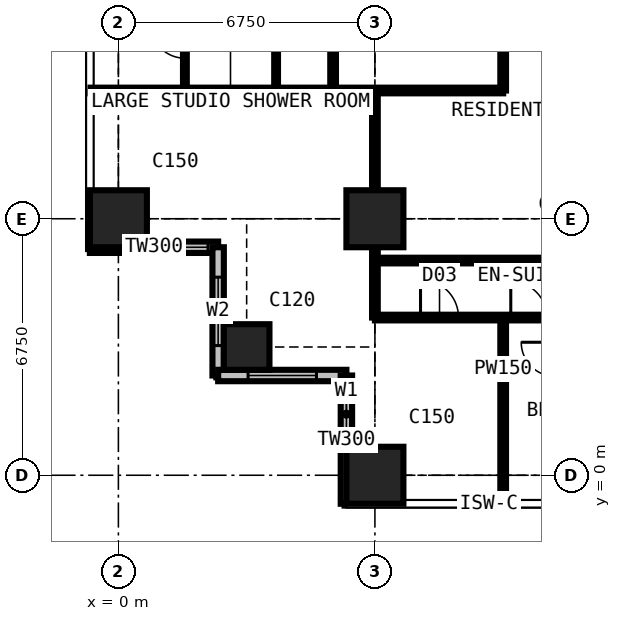
"""IFC4 building model, lengths in metres.
Left out: names, types, materials, properties, quantities, classifications, styles, units other than length and angle.
Written with IfcOpenShell. Run it as: python <this file> out.ifc"""

import sys

from ifc_helpers import new_model, si_unit, direction, frame, frame_2d, origin, origin_2d, place, context, subcontext, project, spatial, rectangle, extrude, element, fill, save


model = new_model("IFC4")
c1 = context("Model", 3, precision=1e-05, world=origin(), true_north=direction((0.0, 1.0)))
c2 = subcontext(c1, "Body", "Model", "MODEL_VIEW")
j1 = project(units=[si_unit("LENGTHUNIT", "METRE"), si_unit("PLANEANGLEUNIT", "RADIAN")], contexts=[c1])
p1 = place(None, origin())
s1 = spatial("IfcSite", under=j1, at=p1, CompositionType="ELEMENT")
p2 = place(p1, origin())
s2 = spatial("IfcBuilding", under=s1, at=p2, CompositionType="ELEMENT")
p3 = place(p2, frame((0.0, 0.0, 149.4)))
s3 = spatial("IfcBuildingStorey", under=s2, at=p3, CompositionType="ELEMENT", Elevation=149.4)
p4 = place(p3, frame((0.0, 6.75, 0.0), z_axis=(0.0, 0.0, 1.0), x_axis=(1.0, 0.0, 0.0)))
e1 = element("IfcColumn", 1, at=p4, inside=s3, PredefinedType="COLUMN", context=c2, shape_type="SweptSolid", body=[
    extrude(rectangle(XDim=1.5, YDim=1.5, at=origin_2d()), origin(), (0.0, 0.0, 1.0), 3.6),
])
p5 = place(p3, frame((3.375, 3.375, 0.0), z_axis=(0.0, 0.0, 1.0), x_axis=(1.0, 0.0, 0.0)))
e2 = element("IfcColumn", 2, at=p5, inside=s3, PredefinedType="COLUMN", context=c2, shape_type="SweptSolid", body=[
    extrude(rectangle(XDim=1.2, YDim=1.2, at=origin_2d()), origin(), (0.0, 0.0, 1.0), 3.6),
])
for number, where, z_axis, x_axis in (
    (3, (6.75, 0.0, 0.0), (0.0, 0.0, 1.0), (1.0, 0.0, 0.0)),
    (4, (6.75, 6.75, 0.0), (0.0, 0.0, 1.0), (1.0, 0.0, 0.0)),
):
    element("IfcColumn", number, at=place(p3, frame(where, z_axis=z_axis, x_axis=x_axis)), inside=s3, PredefinedType="COLUMN", context=c2, shape_type="SweptSolid", body=[
        extrude(rectangle(XDim=1.5, YDim=1.5, at=origin_2d()), origin(), (0.0, 0.0, 1.0), 3.6),
    ])
p6 = place(p3, frame((-0.75, 6.0, 0.0), z_axis=(0.0, 0.0, 1.0), x_axis=(1.0, 0.0, 0.0)))
e5 = element("IfcWall", 5, at=p6, inside=s3, PredefinedType="SOLIDWALL", context=c2, shape_type="SweptSolid", body=[
    extrude(rectangle(XDim=3.375, YDim=0.3, at=frame_2d((1.688, 0.0))), origin(), (0.0, 0.0, 1.0), 3.375),
])
p7 = place(p6, frame((1.607, 0.0, 0.9)))
e6 = element("IfcOpeningElement", 6, at=p7, cuts=e5, PredefinedType="OPENING", context=c2, shape_type="SweptSolid", body=[
    extrude(rectangle(XDim=1.5, YDim=1.8, at=frame_2d((0.75, 0.9))), frame((0.0, 0.16, 0.0), z_axis=(0.0, -1.0, 0.0), x_axis=(1.0, 0.0, 0.0)), (0.0, 0.0, 1.0), 0.32),
])
p8 = place(p3, frame((2.625, 6.0, 0.0), z_axis=(0.0, 0.0, 1.0), x_axis=(0.0, -1.0, 0.0)))
e7 = element("IfcWall", 7, at=p8, inside=s3, PredefinedType="SOLIDWALL", context=c2, shape_type="SweptSolid", body=[
    extrude(rectangle(XDim=3.375, YDim=0.3, at=frame_2d((1.688, 0.0))), origin(), (0.0, 0.0, 1.0), 3.375),
])
p9 = place(p8, frame((0.788, 0.0, 0.6)))
e8 = element("IfcOpeningElement", 8, at=p9, cuts=e7, PredefinedType="OPENING", context=c2, shape_type="SweptSolid", body=[
    extrude(rectangle(XDim=1.8, YDim=2.1, at=frame_2d((0.9, 1.05))), frame((0.0, 0.16, 0.0), z_axis=(0.0, -1.0, 0.0), x_axis=(1.0, 0.0, 0.0)), (0.0, 0.0, 1.0), 0.32),
])
p10 = place(p3, frame((2.625, 2.625, 0.0), z_axis=(0.0, 0.0, 1.0), x_axis=(1.0, 0.0, 0.0)))
e9 = element("IfcWall", 9, at=p10, inside=s3, PredefinedType="SOLIDWALL", context=c2, shape_type="SweptSolid", body=[
    extrude(rectangle(XDim=3.375, YDim=0.3, at=frame_2d((1.688, 0.0))), origin(), (0.0, 0.0, 1.0), 3.375),
])
p11 = place(p10, frame((0.788, 0.0, 0.6)))
e10 = element("IfcOpeningElement", 10, at=p11, cuts=e9, PredefinedType="OPENING", context=c2, shape_type="SweptSolid", body=[
    extrude(rectangle(XDim=1.8, YDim=2.1, at=frame_2d((0.9, 1.05))), frame((0.0, 0.16, 0.0), z_axis=(0.0, -1.0, 0.0), x_axis=(1.0, 0.0, 0.0)), (0.0, 0.0, 1.0), 0.32),
])
p12 = place(p3, frame((6.0, 2.625, 0.0), z_axis=(0.0, 0.0, 1.0), x_axis=(0.0, -1.0, 0.0)))
e11 = element("IfcWall", 11, at=p12, inside=s3, PredefinedType="SOLIDWALL", context=c2, shape_type="SweptSolid", body=[
    extrude(rectangle(XDim=3.375, YDim=0.3, at=frame_2d((1.688, 0.0))), origin(), (0.0, 0.0, 1.0), 3.375),
])
p13 = place(p12, frame((0.268, 0.0, 0.9)))
e12 = element("IfcOpeningElement", 12, at=p13, cuts=e11, PredefinedType="OPENING", context=c2, shape_type="SweptSolid", body=[
    extrude(rectangle(XDim=1.5, YDim=1.8, at=frame_2d((0.75, 0.9))), frame((0.0, 0.16, 0.0), z_axis=(0.0, -1.0, 0.0), x_axis=(1.0, 0.0, 0.0)), (0.0, 0.0, 1.0), 0.32),
])
p14 = place(p3, frame((-0.734, 10.125, 0.0), z_axis=(0.0, 0.0, 1.0), x_axis=(1.0, 0.0, 0.0)))
e13 = element("IfcWall", 13, at=p14, inside=s3, PredefinedType="PARTITIONING", context=c2, shape_type="SweptSolid", body=[
    extrude(rectangle(XDim=10.859, YDim=0.15, at=frame_2d((5.429, 0.0))), origin(), (0.0, 0.0, 1.0), 3.375),
])
p15 = place(p3, frame((1.75, 10.125, 0.0), z_axis=(0.0, 0.0, 1.0), x_axis=(0.0, 1.0, 0.0)))
e14 = element("IfcWall", 14, at=p15, inside=s3, PredefinedType="PARTITIONING", context=c2, shape_type="SweptSolid", body=[
    extrude(rectangle(XDim=2.6, YDim=0.1, at=frame_2d((1.3, 0.0))), origin(), (0.0, 0.0, 1.0), 3.375),
])
p16 = place(p15, frame((0.85, 0.0, 0.0)))
e15 = element("IfcOpeningElement", 15, at=p16, cuts=e14, PredefinedType="OPENING", context=c2, shape_type="SweptSolid", body=[
    extrude(rectangle(XDim=0.9, YDim=2.2, at=frame_2d((0.45, 1.1))), frame((0.0, 0.06, 0.0), z_axis=(0.0, -1.0, 0.0), x_axis=(1.0, 0.0, 0.0)), (0.0, 0.0, 1.0), 0.12),
])
p17 = place(p3, frame((4.15, 10.125, 0.0), z_axis=(0.0, 0.0, 1.0), x_axis=(0.0, 1.0, 0.0)))
e16 = element("IfcWall", 16, at=p17, inside=s3, PredefinedType="PARTITIONING", context=c2, shape_type="SweptSolid", body=[
    extrude(rectangle(XDim=16.875, YDim=0.1, at=frame_2d((8.438, 0.0))), origin(), (0.0, 0.0, 1.0), 3.375),
])
p18 = place(p17, frame((4.2, 0.0, 0.0)))
e17 = element("IfcOpeningElement", 17, at=p18, cuts=e16, PredefinedType="OPENING", context=c2, shape_type="SweptSolid", body=[
    extrude(rectangle(XDim=0.95, YDim=2.2, at=frame_2d((0.475, 1.1))), frame((0.0, 0.06, 0.0), z_axis=(0.0, -1.0, 0.0), x_axis=(1.0, 0.0, 0.0)), (0.0, 0.0, 1.0), 0.12),
])
p19 = place(p17, frame((10.95, 0.0, 0.0)))
e18 = element("IfcOpeningElement", 18, at=p19, cuts=e16, PredefinedType="OPENING", context=c2, shape_type="SweptSolid", body=[
    extrude(rectangle(XDim=0.95, YDim=2.2, at=frame_2d((0.475, 1.1))), frame((0.0, 0.06, 0.0), z_axis=(0.0, -1.0, 0.0), x_axis=(1.0, 0.0, 0.0)), (0.0, 0.0, 1.0), 0.12),
])
p20 = place(p3, frame((5.65, 10.125, 0.0), z_axis=(0.0, 0.0, 1.0), x_axis=(0.0, 1.0, 0.0)))
e19 = element("IfcWall", 19, at=p20, inside=s3, PredefinedType="PARTITIONING", context=c2, shape_type="SweptSolid", body=[
    extrude(rectangle(XDim=10.762, YDim=0.15, at=frame_2d((5.381, 0.0))), origin(), (0.0, 0.0, 1.0), 3.375),
])
p21 = place(p20, frame((4.9, 0.0, 0.0)))
e20 = element("IfcOpeningElement", 20, at=p21, cuts=e19, PredefinedType="OPENING", context=c2, shape_type="SweptSolid", body=[
    extrude(rectangle(XDim=0.95, YDim=2.2, at=frame_2d((0.475, 1.1))), frame((0.0, 0.085, 0.0), z_axis=(0.0, -1.0, 0.0), x_axis=(1.0, 0.0, 0.0)), (0.0, 0.0, 1.0), 0.17),
])
p22 = place(p3, frame((6.75, 4.15, 0.0), z_axis=(0.0, 0.0, 1.0), x_axis=(0.0, 1.0, 0.0)))
e21 = element("IfcWall", 21, at=p22, inside=s3, PredefinedType="PARTITIONING", context=c2, shape_type="SweptSolid", body=[
    extrude(rectangle(XDim=5.975, YDim=0.15, at=frame_2d((2.988, 0.0))), origin(), (0.0, 0.0, 1.0), 2.877),
])
p23 = place(p3, frame((6.75, 4.15, 0.0), z_axis=(0.0, 0.0, 1.0), x_axis=(1.0, 0.0, 0.0)))
e22 = element("IfcWall", 22, at=p23, inside=s3, PredefinedType="PARTITIONING", context=c2, shape_type="SweptSolid", body=[
    extrude(rectangle(XDim=20.25, YDim=0.15, at=frame_2d((10.125, 0.0))), origin(), (0.0, 0.0, 1.0), 3.375),
])
p24 = place(p23, frame((1.2, 0.0, 0.0)))
e23 = element("IfcOpeningElement", 23, at=p24, cuts=e22, PredefinedType="OPENING", context=c2, shape_type="SweptSolid", body=[
    extrude(rectangle(XDim=1.0, YDim=2.2, at=frame_2d((0.5, 1.1))), frame((0.0, 0.085, 0.0), z_axis=(0.0, -1.0, 0.0), x_axis=(1.0, 0.0, 0.0)), (0.0, 0.0, 1.0), 0.17),
])
p25 = place(p23, frame((3.575, 0.0, 0.0)))
e24 = element("IfcOpeningElement", 24, at=p25, cuts=e22, PredefinedType="OPENING", context=c2, shape_type="SweptSolid", body=[
    extrude(rectangle(XDim=0.95, YDim=2.2, at=frame_2d((0.475, 1.1))), frame((0.0, 0.085, 0.0), z_axis=(0.0, -1.0, 0.0), x_axis=(1.0, 0.0, 0.0)), (0.0, 0.0, 1.0), 0.17),
])
p26 = place(p23, frame((7.0, 0.0, 0.0)))
e25 = element("IfcOpeningElement", 25, at=p26, cuts=e22, PredefinedType="OPENING", context=c2, shape_type="SweptSolid", body=[
    extrude(rectangle(XDim=0.95, YDim=2.2, at=frame_2d((0.475, 1.1))), frame((0.0, 0.085, 0.0), z_axis=(0.0, -1.0, 0.0), x_axis=(1.0, 0.0, 0.0)), (0.0, 0.0, 1.0), 0.17),
])
p27 = place(p23, frame((10.375, 0.0, 0.0)))
e26 = element("IfcOpeningElement", 26, at=p27, cuts=e22, PredefinedType="OPENING", context=c2, shape_type="SweptSolid", body=[
    extrude(rectangle(XDim=0.95, YDim=2.2, at=frame_2d((0.475, 1.1))), frame((0.0, 0.085, 0.0), z_axis=(0.0, -1.0, 0.0), x_axis=(1.0, 0.0, 0.0)), (0.0, 0.0, 1.0), 0.17),
])
p28 = place(p23, frame((15.1, 0.0, 0.0)))
e27 = element("IfcOpeningElement", 27, at=p28, cuts=e22, PredefinedType="OPENING", context=c2, shape_type="SweptSolid", body=[
    extrude(rectangle(XDim=0.95, YDim=2.2, at=frame_2d((0.475, 1.1))), frame((0.0, 0.085, 0.0), z_axis=(0.0, -1.0, 0.0), x_axis=(1.0, 0.0, 0.0)), (0.0, 0.0, 1.0), 0.17),
])
p29 = place(p3, frame((6.75, 5.65, 0.0), z_axis=(0.0, 0.0, 1.0), x_axis=(1.0, 0.0, 0.0)))
e28 = element("IfcWall", 28, at=p29, inside=s3, PredefinedType="PARTITIONING", context=c2, shape_type="SweptSolid", body=[
    extrude(rectangle(XDim=11.05, YDim=0.15, at=frame_2d((5.525, 0.0))), origin(), (0.0, 0.0, 1.0), 3.375),
])
p30 = place(p3, frame((10.125, -0.734, 0.0), z_axis=(0.0, 0.0, 1.0), x_axis=(0.0, 1.0, 0.0)))
e29 = element("IfcWall", 29, at=p30, inside=s3, PredefinedType="PARTITIONING", context=c2, shape_type="SweptSolid", body=[
    extrude(rectangle(XDim=4.884, YDim=0.15, at=frame_2d((2.442, 0.0))), origin(), (0.0, 0.0, 1.0), 3.375),
])
p31 = place(p3, frame((10.125, 10.125, 0.0), z_axis=(0.0, 0.0, 1.0), x_axis=(0.0, 1.0, 0.0)))
e30 = element("IfcWall", 30, at=p31, inside=s3, PredefinedType="PARTITIONING", context=c2, shape_type="SweptSolid", body=[
    extrude(rectangle(XDim=1.175, YDim=0.15, at=frame_2d((0.587, 0.0))), origin(), (0.0, 0.0, 1.0), 3.375),
])
p32 = place(p7, origin())
e31 = element("IfcWindow", 31, at=p32, inside=s3, PartitioningType="SINGLE_PANEL", PredefinedType="WINDOW", context=c2, shape_type="SweptSolid", body=[
    extrude(rectangle(XDim=1.5, YDim=1.8, at=frame_2d((0.75, 0.9))), frame((0.0, 0.03, 0.0), z_axis=(0.0, -1.0, 0.0), x_axis=(1.0, 0.0, 0.0)), (0.0, 0.0, 1.0), 0.06),
])
fill(e6, e31)
p33 = place(p9, origin())
e32 = element("IfcWindow", 32, at=p33, inside=s3, PartitioningType="SINGLE_PANEL", PredefinedType="WINDOW", context=c2, shape_type="SweptSolid", body=[
    extrude(rectangle(XDim=1.8, YDim=2.1, at=frame_2d((0.9, 1.05))), frame((0.0, 0.03, 0.0), z_axis=(0.0, -1.0, 0.0), x_axis=(1.0, 0.0, 0.0)), (0.0, 0.0, 1.0), 0.06),
])
fill(e8, e32)
p34 = place(p11, origin())
e33 = element("IfcWindow", 33, at=p34, inside=s3, PartitioningType="SINGLE_PANEL", PredefinedType="WINDOW", context=c2, shape_type="SweptSolid", body=[
    extrude(rectangle(XDim=1.8, YDim=2.1, at=frame_2d((0.9, 1.05))), frame((0.0, 0.03, 0.0), z_axis=(0.0, -1.0, 0.0), x_axis=(1.0, 0.0, 0.0)), (0.0, 0.0, 1.0), 0.06),
])
fill(e10, e33)
p35 = place(p13, origin())
e34 = element("IfcWindow", 34, at=p35, inside=s3, PartitioningType="SINGLE_PANEL", PredefinedType="WINDOW", context=c2, shape_type="SweptSolid", body=[
    extrude(rectangle(XDim=1.5, YDim=1.8, at=frame_2d((0.75, 0.9))), frame((0.0, 0.03, 0.0), z_axis=(0.0, -1.0, 0.0), x_axis=(1.0, 0.0, 0.0)), (0.0, 0.0, 1.0), 0.06),
])
fill(e12, e34)
p36 = place(p24, origin())
e35 = element("IfcDoor", 35, at=p36, inside=s3, OperationType="SINGLE_SWING_LEFT", PredefinedType="DOOR", context=c2, shape_type="SweptSolid", body=[
    extrude(rectangle(XDim=1.0, YDim=2.2, at=frame_2d((0.5, 1.1))), frame((0.0, 0.025, 0.0), z_axis=(0.0, -1.0, 0.0), x_axis=(1.0, 0.0, 0.0)), (0.0, 0.0, 1.0), 0.05),
])
fill(e23, e35)
p37 = place(p25, origin())
e36 = element("IfcDoor", 36, at=p37, inside=s3, OperationType="SINGLE_SWING_LEFT", PredefinedType="DOOR", context=c2, shape_type="SweptSolid", body=[
    extrude(rectangle(XDim=0.95, YDim=2.2, at=frame_2d((0.475, 1.1))), frame((0.0, 0.025, 0.0), z_axis=(0.0, -1.0, 0.0), x_axis=(1.0, 0.0, 0.0)), (0.0, 0.0, 1.0), 0.05),
])
fill(e24, e36)
p38 = place(p16, origin())
e37 = element("IfcDoor", 37, at=p38, inside=s3, OperationType="SINGLE_SWING_RIGHT", PredefinedType="DOOR", context=c2, shape_type="SweptSolid", body=[
    extrude(rectangle(XDim=0.9, YDim=2.2, at=frame_2d((0.45, 1.1))), frame((0.0, 0.025, 0.0), z_axis=(0.0, -1.0, 0.0), x_axis=(1.0, 0.0, 0.0)), (0.0, 0.0, 1.0), 0.05),
])
fill(e15, e37)
save(model, sys.argv[1])
